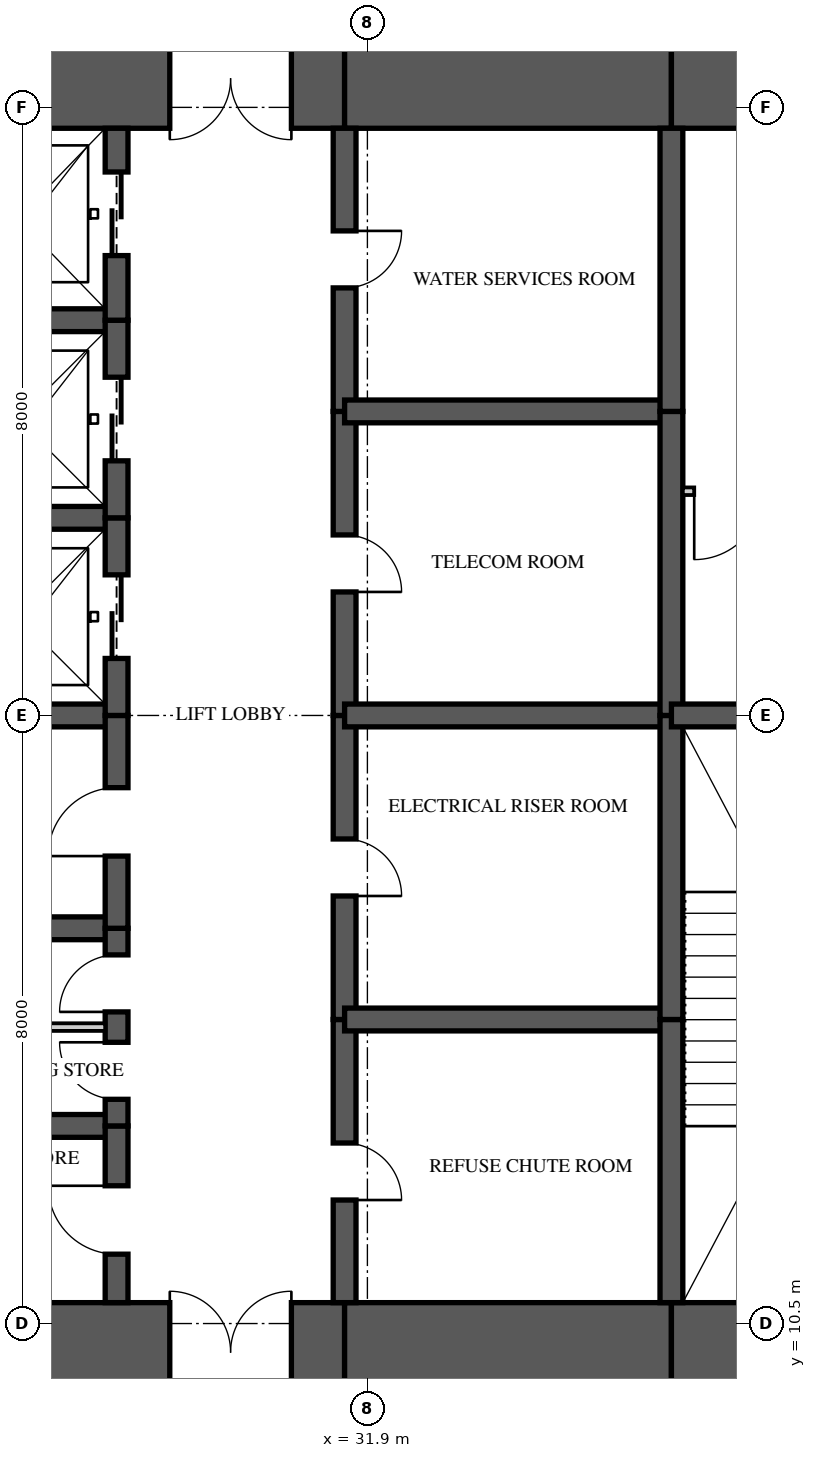
"""IFC4 building model, lengths in metres.
Left out: names, types, materials, properties, quantities, classifications, styles, units other than length and angle.
Written with IfcOpenShell. Run it as: python <this file> out.ifc"""

import sys

from ifc_helpers import new_model, si_unit, direction, frame, frame_2d, origin, place, context, subcontext, project, spatial, rectangle, extrude, element, fill, save


model = new_model("IFC4")
c1 = context("Model", 3, precision=1e-05, world=origin(), true_north=direction((0.0, 1.0)))
c2 = subcontext(c1, "Body", "Model", "MODEL_VIEW")
j1 = project(units=[si_unit("LENGTHUNIT", "METRE"), si_unit("PLANEANGLEUNIT", "RADIAN")], contexts=[c1])
p1 = place(None, origin())
s1 = spatial("IfcSite", under=j1, at=p1, CompositionType="ELEMENT")
p2 = place(p1, origin())
s2 = spatial("IfcBuilding", under=s1, at=p2, CompositionType="ELEMENT")
p3 = place(p2, frame((0.0, 0.0, 161.05)))
s3 = spatial("IfcBuildingStorey", under=s2, at=p3, CompositionType="ELEMENT", Elevation=161.05)
p4 = place(p3, frame((26.0, 10.125, 0.0), z_axis=(0.0, 0.0, 1.0), x_axis=(1.0, 0.0, 0.0)))
e1 = element("IfcWall", 1, at=p4, inside=s3, PredefinedType="SHEAR", context=c2, shape_type="SweptSolid", body=[
    extrude(rectangle(XDim=5.6, YDim=1.3, at=frame_2d((2.8, 0.0))), origin(), (0.0, 0.0, 1.0), 3.35),
])
p5 = place(p4, frame((3.3, 0.0, 0.0)))
e2 = element("IfcOpeningElement", 2, at=p5, cuts=e1, PredefinedType="OPENING", context=c2, shape_type="SweptSolid", body=[
    extrude(rectangle(XDim=1.6, YDim=2.1, at=frame_2d((0.8, 1.05))), frame((0.0, 0.66, 0.0), z_axis=(0.0, -1.0, 0.0), x_axis=(1.0, 0.0, 0.0)), (0.0, 0.0, 1.0), 1.32),
])
p6 = place(p3, frame((31.6, 10.125, 0.0), z_axis=(0.0, 0.0, 1.0), x_axis=(1.0, 0.0, 0.0)))
e3 = element("IfcWall", 3, at=p6, inside=s3, PredefinedType="SHEAR", context=c2, shape_type="SweptSolid", body=[
    extrude(rectangle(XDim=4.3, YDim=1.3, at=frame_2d((2.15, 0.0))), origin(), (0.0, 0.0, 1.0), 3.35),
])
p7 = place(p3, frame((35.9, 10.125, 0.0), z_axis=(0.0, 0.0, 1.0), x_axis=(1.0, 0.0, 0.0)))
e4 = element("IfcWall", 4, at=p7, inside=s3, PredefinedType="SHEAR", context=c2, shape_type="SweptSolid", body=[
    extrude(rectangle(XDim=8.25, YDim=1.3, at=frame_2d((4.125, 0.0))), origin(), (0.0, 0.0, 1.0), 3.35),
])
p8 = place(p7, frame((2.7, 0.0, 0.0)))
e5 = element("IfcOpeningElement", 5, at=p8, cuts=e4, PredefinedType="OPENING", context=c2, shape_type="SweptSolid", body=[
    extrude(rectangle(XDim=1.0, YDim=2.1, at=frame_2d((0.5, 1.05))), frame((0.0, 0.66, 0.0), z_axis=(0.0, -1.0, 0.0), x_axis=(1.0, 0.0, 0.0)), (0.0, 0.0, 1.0), 1.32),
])
p9 = place(p3, frame((44.15, 26.875, 0.0), z_axis=(0.0, 0.0, 1.0), x_axis=(-1.0, 0.0, 0.0)))
e6 = element("IfcWall", 6, at=p9, inside=s3, PredefinedType="SHEAR", context=c2, shape_type="SweptSolid", body=[
    extrude(rectangle(XDim=8.25, YDim=1.3, at=frame_2d((4.125, 0.0))), origin(), (0.0, 0.0, 1.0), 3.35),
])
p10 = place(p9, frame((5.65, 0.0, 0.0)))
e7 = element("IfcOpeningElement", 7, at=p10, cuts=e6, PredefinedType="OPENING", context=c2, shape_type="SweptSolid", body=[
    extrude(rectangle(XDim=0.9, YDim=2.1, at=frame_2d((0.45, 1.05))), frame((0.0, 0.66, 0.0), z_axis=(0.0, -1.0, 0.0), x_axis=(1.0, 0.0, 0.0)), (0.0, 0.0, 1.0), 1.32),
])
p11 = place(p3, frame((35.9, 26.875, 0.0), z_axis=(0.0, 0.0, 1.0), x_axis=(-1.0, 0.0, 0.0)))
e8 = element("IfcWall", 8, at=p11, inside=s3, PredefinedType="SHEAR", context=c2, shape_type="SweptSolid", body=[
    extrude(rectangle(XDim=4.3, YDim=1.3, at=frame_2d((2.15, 0.0))), origin(), (0.0, 0.0, 1.0), 3.35),
])
p12 = place(p3, frame((31.6, 26.875, 0.0), z_axis=(0.0, 0.0, 1.0), x_axis=(-1.0, 0.0, 0.0)))
e9 = element("IfcWall", 9, at=p12, inside=s3, PredefinedType="SHEAR", context=c2, shape_type="SweptSolid", body=[
    extrude(rectangle(XDim=5.6, YDim=1.3, at=frame_2d((2.8, 0.0))), origin(), (0.0, 0.0, 1.0), 3.35),
])
p13 = place(p12, frame((0.7, 0.0, 0.0)))
e10 = element("IfcOpeningElement", 10, at=p13, cuts=e9, PredefinedType="OPENING", context=c2, shape_type="SweptSolid", body=[
    extrude(rectangle(XDim=1.6, YDim=2.1, at=frame_2d((0.8, 1.05))), frame((0.0, 0.66, 0.0), z_axis=(0.0, -1.0, 0.0), x_axis=(1.0, 0.0, 0.0)), (0.0, 0.0, 1.0), 1.32),
])
p14 = place(p3, frame((28.6, 10.775, 0.0), z_axis=(0.0, 0.0, 1.0), x_axis=(0.0, 1.0, 0.0)))
e11 = element("IfcWall", 11, at=p14, inside=s3, PredefinedType="SHEAR", context=c2, shape_type="SweptSolid", body=[
    extrude(rectangle(XDim=2.325, YDim=0.3, at=frame_2d((1.163, 0.0))), origin(), (0.0, 0.0, 1.0), 3.35),
])
p15 = place(p14, frame((0.637, 0.0, 0.0)))
e12 = element("IfcOpeningElement", 12, at=p15, cuts=e11, PredefinedType="OPENING", context=c2, shape_type="SweptSolid", body=[
    extrude(rectangle(XDim=0.9, YDim=2.1, at=frame_2d((0.45, 1.05))), frame((0.0, 0.16, 0.0), z_axis=(0.0, -1.0, 0.0), x_axis=(1.0, 0.0, 0.0)), (0.0, 0.0, 1.0), 0.32),
])
p16 = place(p3, frame((28.6, 13.1, 0.0), z_axis=(0.0, 0.0, 1.0), x_axis=(0.0, 1.0, 0.0)))
e13 = element("IfcWall", 13, at=p16, inside=s3, PredefinedType="SHEAR", context=c2, shape_type="SweptSolid", body=[
    extrude(rectangle(XDim=2.6, YDim=0.3, at=frame_2d((1.3, 0.0))), origin(), (0.0, 0.0, 1.0), 3.35),
])
p17 = place(p16, frame((0.35, 0.0, 0.0)))
e14 = element("IfcOpeningElement", 14, at=p17, cuts=e13, PredefinedType="OPENING", context=c2, shape_type="SweptSolid", body=[
    extrude(rectangle(XDim=0.75, YDim=2.1, at=frame_2d((0.375, 1.05))), frame((0.0, 0.16, 0.0), z_axis=(0.0, -1.0, 0.0), x_axis=(1.0, 0.0, 0.0)), (0.0, 0.0, 1.0), 0.32),
])
p18 = place(p16, frame((1.5, 0.0, 0.0)))
e15 = element("IfcOpeningElement", 15, at=p18, cuts=e13, PredefinedType="OPENING", context=c2, shape_type="SweptSolid", body=[
    extrude(rectangle(XDim=0.75, YDim=2.1, at=frame_2d((0.375, 1.05))), frame((0.0, 0.16, 0.0), z_axis=(0.0, -1.0, 0.0), x_axis=(1.0, 0.0, 0.0)), (0.0, 0.0, 1.0), 0.32),
])
p19 = place(p3, frame((28.6, 15.7, 0.0), z_axis=(0.0, 0.0, 1.0), x_axis=(0.0, 1.0, 0.0)))
e16 = element("IfcWall", 16, at=p19, inside=s3, PredefinedType="SHEAR", context=c2, shape_type="SweptSolid", body=[
    extrude(rectangle(XDim=2.8, YDim=0.3, at=frame_2d((1.4, 0.0))), origin(), (0.0, 0.0, 1.0), 3.35),
])
p20 = place(p19, frame((0.95, 0.0, 0.0)))
e17 = element("IfcOpeningElement", 17, at=p20, cuts=e16, PredefinedType="OPENING", context=c2, shape_type="SweptSolid", body=[
    extrude(rectangle(XDim=0.9, YDim=2.1, at=frame_2d((0.45, 1.05))), frame((0.0, 0.16, 0.0), z_axis=(0.0, -1.0, 0.0), x_axis=(1.0, 0.0, 0.0)), (0.0, 0.0, 1.0), 0.32),
])
p21 = place(p3, frame((28.6, 18.5, 0.0), z_axis=(0.0, 0.0, 1.0), x_axis=(0.0, 1.0, 0.0)))
e18 = element("IfcWall", 18, at=p21, inside=s3, PredefinedType="SHEAR", context=c2, shape_type="SweptSolid", body=[
    extrude(rectangle(XDim=2.6, YDim=0.3, at=frame_2d((1.3, 0.0))), origin(), (0.0, 0.0, 1.0), 3.35),
])
p22 = place(p21, frame((0.75, 0.0, 0.0)))
e19 = element("IfcOpeningElement", 19, at=p22, cuts=e18, PredefinedType="OPENING", context=c2, shape_type="SweptSolid", body=[
    extrude(rectangle(XDim=1.1, YDim=2.1, at=frame_2d((0.55, 1.05))), frame((0.0, 0.16, 0.0), z_axis=(0.0, -1.0, 0.0), x_axis=(1.0, 0.0, 0.0)), (0.0, 0.0, 1.0), 0.32),
])
p23 = place(p3, frame((28.6, 21.1, 0.0), z_axis=(0.0, 0.0, 1.0), x_axis=(0.0, 1.0, 0.0)))
e20 = element("IfcWall", 20, at=p23, inside=s3, PredefinedType="SHEAR", context=c2, shape_type="SweptSolid", body=[
    extrude(rectangle(XDim=2.6, YDim=0.3, at=frame_2d((1.3, 0.0))), origin(), (0.0, 0.0, 1.0), 3.35),
])
p24 = place(p23, frame((0.75, 0.0, 0.0)))
e21 = element("IfcOpeningElement", 21, at=p24, cuts=e20, PredefinedType="OPENING", context=c2, shape_type="SweptSolid", body=[
    extrude(rectangle(XDim=1.1, YDim=2.1, at=frame_2d((0.55, 1.05))), frame((0.0, 0.16, 0.0), z_axis=(0.0, -1.0, 0.0), x_axis=(1.0, 0.0, 0.0)), (0.0, 0.0, 1.0), 0.32),
])
p25 = place(p3, frame((28.6, 23.7, 0.0), z_axis=(0.0, 0.0, 1.0), x_axis=(0.0, 1.0, 0.0)))
e22 = element("IfcWall", 22, at=p25, inside=s3, PredefinedType="SHEAR", context=c2, shape_type="SweptSolid", body=[
    extrude(rectangle(XDim=2.525, YDim=0.3, at=frame_2d((1.263, 0.0))), origin(), (0.0, 0.0, 1.0), 3.35),
])
p26 = place(p25, frame((0.85, 0.0, 0.0)))
e23 = element("IfcOpeningElement", 23, at=p26, cuts=e22, PredefinedType="OPENING", context=c2, shape_type="SweptSolid", body=[
    extrude(rectangle(XDim=1.1, YDim=2.1, at=frame_2d((0.55, 1.05))), frame((0.0, 0.16, 0.0), z_axis=(0.0, -1.0, 0.0), x_axis=(1.0, 0.0, 0.0)), (0.0, 0.0, 1.0), 0.32),
])
p27 = place(p3, frame((31.6, 10.775, 0.0), z_axis=(0.0, 0.0, 1.0), x_axis=(0.0, 1.0, 0.0)))
e24 = element("IfcWall", 24, at=p27, inside=s3, PredefinedType="SHEAR", context=c2, shape_type="SweptSolid", body=[
    extrude(rectangle(XDim=3.725, YDim=0.3, at=frame_2d((1.863, 0.0))), origin(), (0.0, 0.0, 1.0), 3.35),
])
p28 = place(p27, frame((1.35, 0.0, 0.0)))
e25 = element("IfcOpeningElement", 25, at=p28, cuts=e24, PredefinedType="OPENING", context=c2, shape_type="SweptSolid", body=[
    extrude(rectangle(XDim=0.75, YDim=2.1, at=frame_2d((0.375, 1.05))), frame((0.0, 0.16, 0.0), z_axis=(0.0, -1.0, 0.0), x_axis=(1.0, 0.0, 0.0)), (0.0, 0.0, 1.0), 0.32),
])
p29 = place(p3, frame((31.6, 14.5, 0.0), z_axis=(0.0, 0.0, 1.0), x_axis=(0.0, 1.0, 0.0)))
e26 = element("IfcWall", 26, at=p29, inside=s3, PredefinedType="SHEAR", context=c2, shape_type="SweptSolid", body=[
    extrude(rectangle(XDim=4.0, YDim=0.3, at=frame_2d((2.0, 0.0))), origin(), (0.0, 0.0, 1.0), 3.35),
])
p30 = place(p29, frame((1.625, 0.0, 0.0)))
e27 = element("IfcOpeningElement", 27, at=p30, cuts=e26, PredefinedType="OPENING", context=c2, shape_type="SweptSolid", body=[
    extrude(rectangle(XDim=0.75, YDim=2.1, at=frame_2d((0.375, 1.05))), frame((0.0, 0.16, 0.0), z_axis=(0.0, -1.0, 0.0), x_axis=(1.0, 0.0, 0.0)), (0.0, 0.0, 1.0), 0.32),
])
p31 = place(p3, frame((31.6, 18.5, 0.0), z_axis=(0.0, 0.0, 1.0), x_axis=(0.0, 1.0, 0.0)))
e28 = element("IfcWall", 28, at=p31, inside=s3, PredefinedType="SHEAR", context=c2, shape_type="SweptSolid", body=[
    extrude(rectangle(XDim=4.0, YDim=0.3, at=frame_2d((2.0, 0.0))), origin(), (0.0, 0.0, 1.0), 3.35),
])
p32 = place(p31, frame((1.625, 0.0, 0.0)))
e29 = element("IfcOpeningElement", 29, at=p32, cuts=e28, PredefinedType="OPENING", context=c2, shape_type="SweptSolid", body=[
    extrude(rectangle(XDim=0.75, YDim=2.1, at=frame_2d((0.375, 1.05))), frame((0.0, 0.16, 0.0), z_axis=(0.0, -1.0, 0.0), x_axis=(1.0, 0.0, 0.0)), (0.0, 0.0, 1.0), 0.32),
])
p33 = place(p3, frame((31.6, 22.5, 0.0), z_axis=(0.0, 0.0, 1.0), x_axis=(0.0, 1.0, 0.0)))
e30 = element("IfcWall", 30, at=p33, inside=s3, PredefinedType="SHEAR", context=c2, shape_type="SweptSolid", body=[
    extrude(rectangle(XDim=3.725, YDim=0.3, at=frame_2d((1.863, 0.0))), origin(), (0.0, 0.0, 1.0), 3.35),
])
p34 = place(p33, frame((1.625, 0.0, 0.0)))
e31 = element("IfcOpeningElement", 31, at=p34, cuts=e30, PredefinedType="OPENING", context=c2, shape_type="SweptSolid", body=[
    extrude(rectangle(XDim=0.75, YDim=2.1, at=frame_2d((0.375, 1.05))), frame((0.0, 0.16, 0.0), z_axis=(0.0, -1.0, 0.0), x_axis=(1.0, 0.0, 0.0)), (0.0, 0.0, 1.0), 0.32),
])
p35 = place(p3, frame((35.9, 10.775, 0.0), z_axis=(0.0, 0.0, 1.0), x_axis=(0.0, 1.0, 0.0)))
e32 = element("IfcWall", 32, at=p35, inside=s3, PredefinedType="SHEAR", context=c2, shape_type="SweptSolid", body=[
    extrude(rectangle(XDim=3.725, YDim=0.3, at=frame_2d((1.863, 0.0))), origin(), (0.0, 0.0, 1.0), 3.35),
])
for number, where, z_axis, x_axis in (
    (33, (35.9, 14.5, 0.0), (0.0, 0.0, 1.0), (0.0, 1.0, 0.0)),
    (34, (35.9, 18.5, 0.0), (0.0, 0.0, 1.0), (0.0, 1.0, 0.0)),
):
    element("IfcWall", number, at=place(p3, frame(where, z_axis=z_axis, x_axis=x_axis)), inside=s3, PredefinedType="SHEAR", context=c2, shape_type="SweptSolid", body=[
        extrude(rectangle(XDim=4.0, YDim=0.3, at=frame_2d((2.0, 0.0))), origin(), (0.0, 0.0, 1.0), 3.35),
    ])
p36 = place(p3, frame((35.9, 22.5, 0.0), z_axis=(0.0, 0.0, 1.0), x_axis=(0.0, 1.0, 0.0)))
e35 = element("IfcWall", 35, at=p36, inside=s3, PredefinedType="SHEAR", context=c2, shape_type="SweptSolid", body=[
    extrude(rectangle(XDim=3.725, YDim=0.3, at=frame_2d((1.863, 0.0))), origin(), (0.0, 0.0, 1.0), 3.35),
])
for number, where, z_axis, x_axis in (
    (36, (26.0, 13.1, 0.0), (0.0, 0.0, 1.0), (1.0, 0.0, 0.0)),
    (37, (26.0, 15.7, 0.0), (0.0, 0.0, 1.0), (1.0, 0.0, 0.0)),
    (38, (26.0, 18.5, 0.0), (0.0, 0.0, 1.0), (1.0, 0.0, 0.0)),
    (39, (26.0, 21.1, 0.0), (0.0, 0.0, 1.0), (1.0, 0.0, 0.0)),
    (40, (26.0, 23.7, 0.0), (0.0, 0.0, 1.0), (1.0, 0.0, 0.0)),
):
    element("IfcWall", number, at=place(p3, frame(where, z_axis=z_axis, x_axis=x_axis)), inside=s3, PredefinedType="SHEAR", context=c2, shape_type="SweptSolid", body=[
        extrude(rectangle(XDim=2.6, YDim=0.3, at=frame_2d((1.3, 0.0))), origin(), (0.0, 0.0, 1.0), 3.35),
    ])
for number, where, z_axis, x_axis in (
    (41, (31.6, 14.5, 0.0), (0.0, 0.0, 1.0), (1.0, 0.0, 0.0)),
    (42, (31.6, 18.5, 0.0), (0.0, 0.0, 1.0), (1.0, 0.0, 0.0)),
    (43, (31.6, 22.5, 0.0), (0.0, 0.0, 1.0), (1.0, 0.0, 0.0)),
):
    element("IfcWall", number, at=place(p3, frame(where, z_axis=z_axis, x_axis=x_axis)), inside=s3, PredefinedType="SHEAR", context=c2, shape_type="SweptSolid", body=[
        extrude(rectangle(XDim=4.3, YDim=0.3, at=frame_2d((2.15, 0.0))), origin(), (0.0, 0.0, 1.0), 3.35),
    ])
p37 = place(p3, frame((35.9, 18.5, 0.0), z_axis=(0.0, 0.0, 1.0), x_axis=(1.0, 0.0, 0.0)))
e44 = element("IfcWall", 44, at=p37, inside=s3, PredefinedType="SHEAR", context=c2, shape_type="SweptSolid", body=[
    extrude(rectangle(XDim=4.3, YDim=0.3, at=frame_2d((2.15, 0.0))), origin(), (0.0, 0.0, 1.0), 3.35),
])
p38 = place(p3, frame((36.05, 21.45, 0.0), z_axis=(0.0, 0.0, 1.0), x_axis=(1.0, 0.0, 0.0)))
e45 = element("IfcWall", 45, at=p38, inside=s3, PredefinedType="PARTITIONING", context=c2, shape_type="SweptSolid", body=[
    extrude(rectangle(XDim=4.0, YDim=0.1, at=frame_2d((2.0, 0.0))), origin(), (0.0, 0.0, 1.0), 3.11),
])
p39 = place(p38, frame((0.15, 0.0, 0.0)))
e46 = element("IfcOpeningElement", 46, at=p39, cuts=e45, PredefinedType="OPENING", context=c2, shape_type="SweptSolid", body=[
    extrude(rectangle(XDim=0.9, YDim=2.1, at=frame_2d((0.45, 1.05))), frame((0.0, 0.06, 0.0), z_axis=(0.0, -1.0, 0.0), x_axis=(1.0, 0.0, 0.0)), (0.0, 0.0, 1.0), 0.12),
])
p40 = place(p3, frame((26.15, 14.4, 0.0), z_axis=(0.0, 0.0, 1.0), x_axis=(1.0, 0.0, 0.0)))
e47 = element("IfcWall", 47, at=p40, inside=s3, PredefinedType="PARTITIONING", context=c2, shape_type="SweptSolid", body=[
    extrude(rectangle(XDim=2.3, YDim=0.1, at=frame_2d((1.15, 0.0))), origin(), (0.0, 0.0, 1.0), 3.11),
])
p41 = place(p39, frame((0.9, 0.0, 0.0), z_axis=(0.0, 0.0, 1.0), x_axis=(-1.0, 0.0, 0.0)))
e48 = element("IfcDoor", 48, at=p41, inside=s3, OperationType="SINGLE_SWING_RIGHT", PredefinedType="DOOR", context=c2, shape_type="SweptSolid", body=[
    extrude(rectangle(XDim=0.9, YDim=2.1, at=frame_2d((0.45, 1.05))), frame((0.0, 0.025, 0.0), z_axis=(0.0, -1.0, 0.0), x_axis=(1.0, 0.0, 0.0)), (0.0, 0.0, 1.0), 0.05),
])
fill(e46, e48)
p42 = place(p22, origin())
e49 = element("IfcDoor", 49, at=p42, inside=s3, OperationType="SLIDING_TO_LEFT", PredefinedType="DOOR", context=c2, shape_type="SweptSolid", body=[
    extrude(rectangle(XDim=1.1, YDim=2.1, at=frame_2d((0.55, 1.05))), frame((0.0, 0.025, 0.0), z_axis=(0.0, -1.0, 0.0), x_axis=(1.0, 0.0, 0.0)), (0.0, 0.0, 1.0), 0.05),
])
fill(e19, e49)
p43 = place(p24, origin())
e50 = element("IfcDoor", 50, at=p43, inside=s3, OperationType="SLIDING_TO_LEFT", PredefinedType="DOOR", context=c2, shape_type="SweptSolid", body=[
    extrude(rectangle(XDim=1.1, YDim=2.1, at=frame_2d((0.55, 1.05))), frame((0.0, 0.025, 0.0), z_axis=(0.0, -1.0, 0.0), x_axis=(1.0, 0.0, 0.0)), (0.0, 0.0, 1.0), 0.05),
])
fill(e21, e50)
p44 = place(p26, origin())
e51 = element("IfcDoor", 51, at=p44, inside=s3, OperationType="SLIDING_TO_LEFT", PredefinedType="DOOR", context=c2, shape_type="SweptSolid", body=[
    extrude(rectangle(XDim=1.1, YDim=2.1, at=frame_2d((0.55, 1.05))), frame((0.0, 0.025, 0.0), z_axis=(0.0, -1.0, 0.0), x_axis=(1.0, 0.0, 0.0)), (0.0, 0.0, 1.0), 0.05),
])
fill(e23, e51)
p45 = place(p15, origin())
e52 = element("IfcDoor", 52, at=p45, inside=s3, OperationType="SINGLE_SWING_RIGHT", PredefinedType="DOOR", context=c2, shape_type="SweptSolid", body=[
    extrude(rectangle(XDim=0.9, YDim=2.1, at=frame_2d((0.45, 1.05))), frame((0.0, 0.025, 0.0), z_axis=(0.0, -1.0, 0.0), x_axis=(1.0, 0.0, 0.0)), (0.0, 0.0, 1.0), 0.05),
])
fill(e12, e52)
p46 = place(p17, origin())
e53 = element("IfcDoor", 53, at=p46, inside=s3, OperationType="SINGLE_SWING_RIGHT", PredefinedType="DOOR", context=c2, shape_type="SweptSolid", body=[
    extrude(rectangle(XDim=0.75, YDim=2.1, at=frame_2d((0.375, 1.05))), frame((0.0, 0.025, 0.0), z_axis=(0.0, -1.0, 0.0), x_axis=(1.0, 0.0, 0.0)), (0.0, 0.0, 1.0), 0.05),
])
fill(e14, e53)
p47 = place(p18, origin())
e54 = element("IfcDoor", 54, at=p47, inside=s3, OperationType="SINGLE_SWING_LEFT", PredefinedType="DOOR", context=c2, shape_type="SweptSolid", body=[
    extrude(rectangle(XDim=0.75, YDim=2.1, at=frame_2d((0.375, 1.05))), frame((0.0, 0.025, 0.0), z_axis=(0.0, -1.0, 0.0), x_axis=(1.0, 0.0, 0.0)), (0.0, 0.0, 1.0), 0.05),
])
fill(e15, e54)
p48 = place(p20, origin())
e55 = element("IfcDoor", 55, at=p48, inside=s3, OperationType="SINGLE_SWING_LEFT", PredefinedType="DOOR", context=c2, shape_type="SweptSolid", body=[
    extrude(rectangle(XDim=0.9, YDim=2.1, at=frame_2d((0.45, 1.05))), frame((0.0, 0.025, 0.0), z_axis=(0.0, -1.0, 0.0), x_axis=(1.0, 0.0, 0.0)), (0.0, 0.0, 1.0), 0.05),
])
fill(e17, e55)
p49 = place(p5, origin())
e56 = element("IfcDoor", 56, at=p49, inside=s3, OperationType="DOUBLE_DOOR_SINGLE_SWING", PredefinedType="DOOR", context=c2, shape_type="SweptSolid", body=[
    extrude(rectangle(XDim=1.6, YDim=2.1, at=frame_2d((0.8, 1.05))), frame((0.0, 0.025, 0.0), z_axis=(0.0, -1.0, 0.0), x_axis=(1.0, 0.0, 0.0)), (0.0, 0.0, 1.0), 0.05),
])
fill(e2, e56)
p50 = place(p13, origin())
e57 = element("IfcDoor", 57, at=p50, inside=s3, OperationType="DOUBLE_DOOR_SINGLE_SWING", PredefinedType="DOOR", context=c2, shape_type="SweptSolid", body=[
    extrude(rectangle(XDim=1.6, YDim=2.1, at=frame_2d((0.8, 1.05))), frame((0.0, 0.025, 0.0), z_axis=(0.0, -1.0, 0.0), x_axis=(1.0, 0.0, 0.0)), (0.0, 0.0, 1.0), 0.05),
])
fill(e10, e57)
p51 = place(p28, frame((0.75, 0.0, 0.0), z_axis=(0.0, 0.0, 1.0), x_axis=(-1.0, 0.0, 0.0)))
e58 = element("IfcDoor", 58, at=p51, inside=s3, OperationType="SINGLE_SWING_RIGHT", PredefinedType="DOOR", context=c2, shape_type="SweptSolid", body=[
    extrude(rectangle(XDim=0.75, YDim=2.1, at=frame_2d((0.375, 1.05))), frame((0.0, 0.025, 0.0), z_axis=(0.0, -1.0, 0.0), x_axis=(1.0, 0.0, 0.0)), (0.0, 0.0, 1.0), 0.05),
])
fill(e25, e58)
p52 = place(p30, frame((0.75, 0.0, 0.0), z_axis=(0.0, 0.0, 1.0), x_axis=(-1.0, 0.0, 0.0)))
e59 = element("IfcDoor", 59, at=p52, inside=s3, OperationType="SINGLE_SWING_RIGHT", PredefinedType="DOOR", context=c2, shape_type="SweptSolid", body=[
    extrude(rectangle(XDim=0.75, YDim=2.1, at=frame_2d((0.375, 1.05))), frame((0.0, 0.025, 0.0), z_axis=(0.0, -1.0, 0.0), x_axis=(1.0, 0.0, 0.0)), (0.0, 0.0, 1.0), 0.05),
])
fill(e27, e59)
p53 = place(p32, frame((0.75, 0.0, 0.0), z_axis=(0.0, 0.0, 1.0), x_axis=(-1.0, 0.0, 0.0)))
e60 = element("IfcDoor", 60, at=p53, inside=s3, OperationType="SINGLE_SWING_RIGHT", PredefinedType="DOOR", context=c2, shape_type="SweptSolid", body=[
    extrude(rectangle(XDim=0.75, YDim=2.1, at=frame_2d((0.375, 1.05))), frame((0.0, 0.025, 0.0), z_axis=(0.0, -1.0, 0.0), x_axis=(1.0, 0.0, 0.0)), (0.0, 0.0, 1.0), 0.05),
])
fill(e29, e60)
p54 = place(p34, frame((0.75, 0.0, 0.0), z_axis=(0.0, 0.0, 1.0), x_axis=(-1.0, 0.0, 0.0)))
e61 = element("IfcDoor", 61, at=p54, inside=s3, OperationType="SINGLE_SWING_LEFT", PredefinedType="DOOR", context=c2, shape_type="SweptSolid", body=[
    extrude(rectangle(XDim=0.75, YDim=2.1, at=frame_2d((0.375, 1.05))), frame((0.0, 0.025, 0.0), z_axis=(0.0, -1.0, 0.0), x_axis=(1.0, 0.0, 0.0)), (0.0, 0.0, 1.0), 0.05),
])
fill(e31, e61)
save(model, sys.argv[1])
